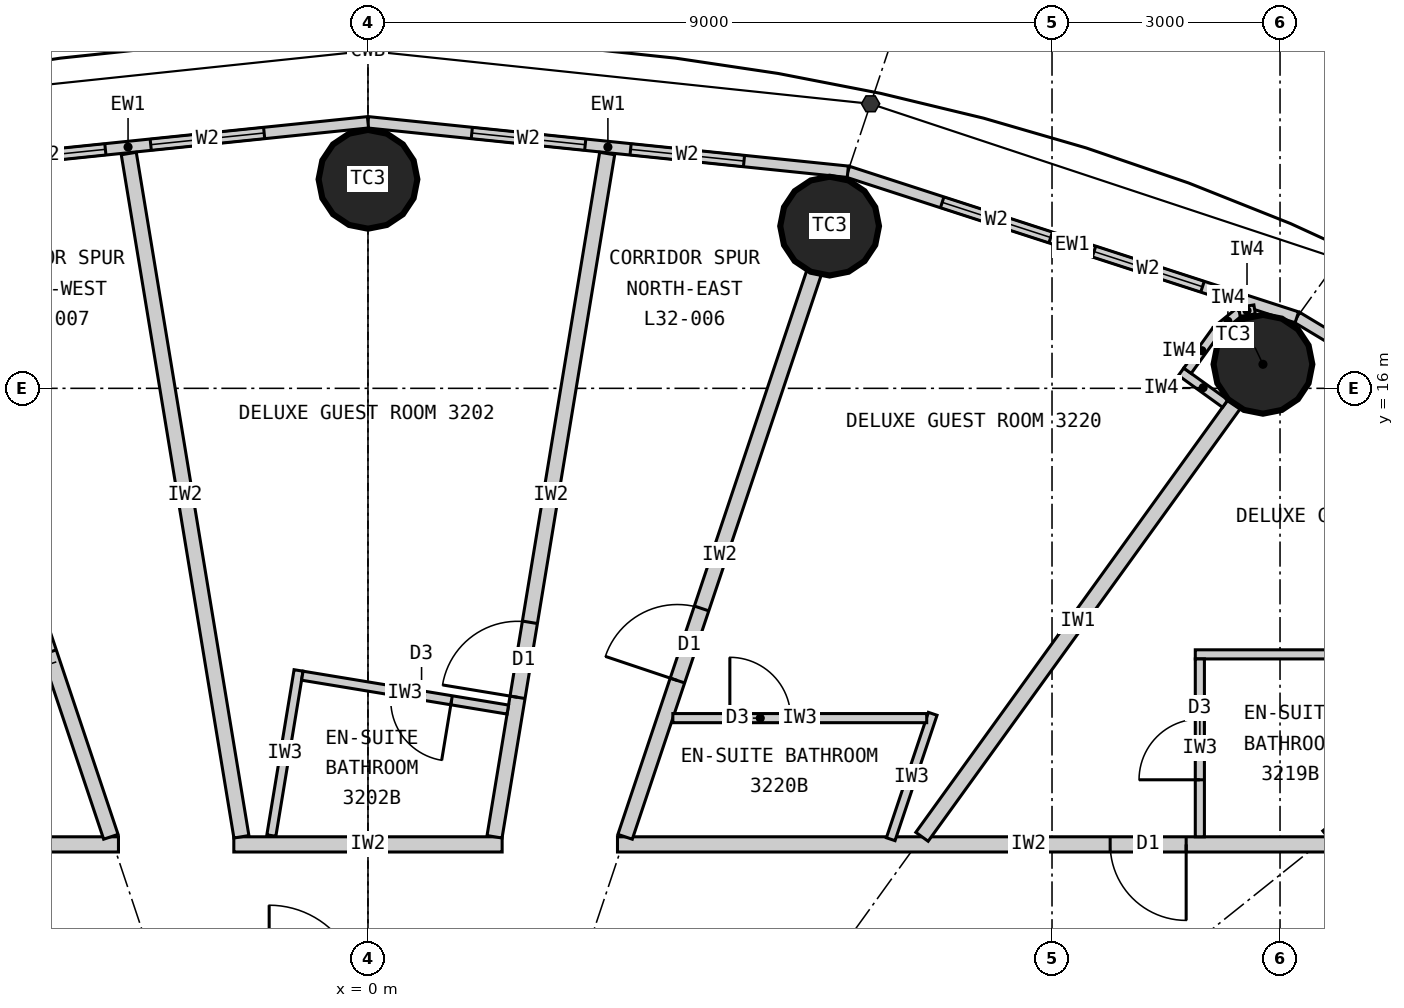
"""IFC4 building model, lengths in metres.
Left out: names, types, materials, properties, quantities, classifications, styles, units other than length and angle.
Written with IfcOpenShell. Run it as: python <this file> out.ifc"""

import sys

from ifc_helpers import new_model, si_unit, direction, frame, frame_2d, origin, origin_2d, place, context, subcontext, project, spatial, rectangle, circle, extrude, element, fill, save


model = new_model("IFC4")
c1 = context("Model", 3, precision=1e-05, world=origin(), true_north=direction((0.0, 1.0)))
c2 = subcontext(c1, "Body", "Model", "MODEL_VIEW")
j1 = project(units=[si_unit("LENGTHUNIT", "METRE"), si_unit("PLANEANGLEUNIT", "RADIAN")], contexts=[c1])
p1 = place(None, origin())
s1 = spatial("IfcSite", under=j1, at=p1, CompositionType="ELEMENT")
p2 = place(p1, origin())
s2 = spatial("IfcBuilding", under=s1, at=p2, CompositionType="ELEMENT")
p3 = place(p2, frame((0.0, 0.0, 125.4)))
s3 = spatial("IfcBuildingStorey", under=s2, at=p3, CompositionType="ELEMENT", Elevation=125.4)
for number, where, z_axis, x_axis in (
    (1, (11.775, 16.316, 0.0), (0.0, 0.0, 1.0), (1.0, 0.0, 0.0)),
    (2, (6.074, 18.135, 0.0), (0.0, 0.0, 1.0), (1.0, 0.0, 0.0)),
    (3, (0.0, 18.75, 0.0), (0.0, 0.0, 1.0), (1.0, 0.0, 0.0)),
):
    element("IfcColumn", number, at=place(p3, frame(where, z_axis=z_axis, x_axis=x_axis)), inside=s3, PredefinedType="COLUMN", context=c2, shape_type="SweptSolid", body=[
        extrude(circle(Radius=0.65, at=origin_2d()), origin(), (0.0, 0.0, 1.0), 3.3),
    ])
p4 = place(p3, frame((17.332, 13.866, 0.0), z_axis=(0.0, 0.0, 1.0), x_axis=(-0.857308573723, 0.514802884044, 0.0)))
e4 = element("IfcWall", 4, at=p4, inside=s3, PredefinedType="ELEMENTEDWALL", context=c2, shape_type="SweptSolid", body=[
    extrude(rectangle(XDim=5.961, YDim=0.15, at=frame_2d((2.98, 0.0))), origin(), (0.0, 0.0, 1.0), 3.12),
])
p5 = place(p4, frame((1.181, 0.0, 0.9)))
e5 = element("IfcOpeningElement", 5, at=p5, cuts=e4, PredefinedType="OPENING", context=c2, shape_type="SweptSolid", body=[
    extrude(rectangle(XDim=1.5, YDim=1.9, at=frame_2d((0.75, 0.95))), frame((0.0, 0.085, 0.0), z_axis=(0.0, -1.0, 0.0), x_axis=(1.0, 0.0, 0.0)), (0.0, 0.0, 1.0), 0.17),
])
p6 = place(p4, frame((3.281, 0.0, 0.9)))
e6 = element("IfcOpeningElement", 6, at=p6, cuts=e4, PredefinedType="OPENING", context=c2, shape_type="SweptSolid", body=[
    extrude(rectangle(XDim=1.5, YDim=1.9, at=frame_2d((0.75, 0.95))), frame((0.0, 0.085, 0.0), z_axis=(0.0, -1.0, 0.0), x_axis=(1.0, 0.0, 0.0)), (0.0, 0.0, 1.0), 0.17),
])
p7 = place(p3, frame((12.221, 16.935, 0.0), z_axis=(0.0, 0.0, 1.0), x_axis=(-0.951272691506, 0.308350881944, 0.0)))
e7 = element("IfcWall", 7, at=p7, inside=s3, PredefinedType="ELEMENTEDWALL", context=c2, shape_type="SweptSolid", body=[
    extrude(rectangle(XDim=6.211, YDim=0.15, at=frame_2d((3.105, 0.0))), origin(), (0.0, 0.0, 1.0), 3.12),
])
p8 = place(p7, frame((1.305, 0.0, 0.9)))
e8 = element("IfcOpeningElement", 8, at=p8, cuts=e7, PredefinedType="OPENING", context=c2, shape_type="SweptSolid", body=[
    extrude(rectangle(XDim=1.5, YDim=1.9, at=frame_2d((0.75, 0.95))), frame((0.0, 0.085, 0.0), z_axis=(0.0, -1.0, 0.0), x_axis=(1.0, 0.0, 0.0)), (0.0, 0.0, 1.0), 0.17),
])
p9 = place(p7, frame((3.405, 0.0, 0.9)))
e9 = element("IfcOpeningElement", 9, at=p9, cuts=e7, PredefinedType="OPENING", context=c2, shape_type="SweptSolid", body=[
    extrude(rectangle(XDim=1.5, YDim=1.9, at=frame_2d((0.75, 0.95))), frame((0.0, 0.085, 0.0), z_axis=(0.0, -1.0, 0.0), x_axis=(1.0, 0.0, 0.0)), (0.0, 0.0, 1.0), 0.17),
])
p10 = place(p3, frame((6.313, 18.85, 0.0), z_axis=(0.0, 0.0, 1.0), x_axis=(-0.994735690163, 0.102473931887, 0.0)))
e10 = element("IfcWall", 10, at=p10, inside=s3, PredefinedType="ELEMENTEDWALL", context=c2, shape_type="SweptSolid", body=[
    extrude(rectangle(XDim=6.347, YDim=0.15, at=frame_2d((3.173, 0.0))), origin(), (0.0, 0.0, 1.0), 3.12),
])
p11 = place(p10, frame((1.373, 0.0, 0.9)))
e11 = element("IfcOpeningElement", 11, at=p11, cuts=e10, PredefinedType="OPENING", context=c2, shape_type="SweptSolid", body=[
    extrude(rectangle(XDim=1.5, YDim=1.9, at=frame_2d((0.75, 0.95))), frame((0.0, 0.085, 0.0), z_axis=(0.0, -1.0, 0.0), x_axis=(1.0, 0.0, 0.0)), (0.0, 0.0, 1.0), 0.17),
])
p12 = place(p10, frame((3.473, 0.0, 0.9)))
e12 = element("IfcOpeningElement", 12, at=p12, cuts=e10, PredefinedType="OPENING", context=c2, shape_type="SweptSolid", body=[
    extrude(rectangle(XDim=1.5, YDim=1.9, at=frame_2d((0.75, 0.95))), frame((0.0, 0.085, 0.0), z_axis=(0.0, -1.0, 0.0), x_axis=(1.0, 0.0, 0.0)), (0.0, 0.0, 1.0), 0.17),
])
p13 = place(p3, frame((0.0, 19.5, 0.0), z_axis=(0.0, 0.0, 1.0), x_axis=(-0.994735690163, -0.102473931887, 0.0)))
e13 = element("IfcWall", 13, at=p13, inside=s3, PredefinedType="ELEMENTEDWALL", context=c2, shape_type="SweptSolid", body=[
    extrude(rectangle(XDim=6.347, YDim=0.15, at=frame_2d((3.173, 0.0))), origin(), (0.0, 0.0, 1.0), 3.12),
])
p14 = place(p13, frame((1.373, 0.0, 0.9)))
e14 = element("IfcOpeningElement", 14, at=p14, cuts=e13, PredefinedType="OPENING", context=c2, shape_type="SweptSolid", body=[
    extrude(rectangle(XDim=1.5, YDim=1.9, at=frame_2d((0.75, 0.95))), frame((0.0, 0.085, 0.0), z_axis=(0.0, -1.0, 0.0), x_axis=(1.0, 0.0, 0.0)), (0.0, 0.0, 1.0), 0.17),
])
p15 = place(p13, frame((3.473, 0.0, 0.9)))
e15 = element("IfcOpeningElement", 15, at=p15, cuts=e13, PredefinedType="OPENING", context=c2, shape_type="SweptSolid", body=[
    extrude(rectangle(XDim=1.5, YDim=1.9, at=frame_2d((0.75, 0.95))), frame((0.0, 0.085, 0.0), z_axis=(0.0, -1.0, 0.0), x_axis=(1.0, 0.0, 0.0)), (0.0, 0.0, 1.0), 0.17),
])
p16 = place(p3, frame((-14.1, 10.0, 0.0), z_axis=(0.0, 0.0, 1.0), x_axis=(1.0, 0.0, 0.0)))
e16 = element("IfcWall", 16, at=p16, inside=s3, PredefinedType="PARTITIONING", context=c2, shape_type="SweptSolid", body=[
    extrude(rectangle(XDim=10.817, YDim=0.2, at=frame_2d((5.409, 0.0))), origin(), (0.0, 0.0, 1.0), 3.12),
])
p17 = place(p3, frame((-1.765, 10.0, 0.0), z_axis=(0.0, 0.0, 1.0), x_axis=(1.0, 0.0, 0.0)))
e17 = element("IfcWall", 17, at=p17, inside=s3, PredefinedType="PARTITIONING", context=c2, shape_type="SweptSolid", body=[
    extrude(rectangle(XDim=3.53, YDim=0.2, at=frame_2d((1.765, 0.0))), origin(), (0.0, 0.0, 1.0), 3.12),
])
p18 = place(p3, frame((3.283, 10.0, 0.0), z_axis=(0.0, 0.0, 1.0), x_axis=(1.0, 0.0, 0.0)))
e18 = element("IfcWall", 18, at=p18, inside=s3, PredefinedType="PARTITIONING", context=c2, shape_type="SweptSolid", body=[
    extrude(rectangle(XDim=10.817, YDim=0.2, at=frame_2d((5.409, 0.0))), origin(), (0.0, 0.0, 1.0), 3.12),
])
p19 = place(p18, frame((6.482, 0.0, 0.0)))
e19 = element("IfcOpeningElement", 19, at=p19, cuts=e18, PredefinedType="OPENING", context=c2, shape_type="SweptSolid", body=[
    extrude(rectangle(XDim=1.0, YDim=2.2, at=frame_2d((0.5, 1.1))), frame((0.0, 0.11, 0.0), z_axis=(0.0, -1.0, 0.0), x_axis=(1.0, 0.0, 0.0)), (0.0, 0.0, 1.0), 0.22),
])
p20 = place(p3, frame((12.625, 10.1, 0.0), z_axis=(0.0, 0.0, 1.0), x_axis=(0.780863644897, 0.624701503182, 0.0)))
e20 = element("IfcWall", 20, at=p20, inside=s3, PredefinedType="PARTITIONING", context=c2, shape_type="SweptSolid", body=[
    extrude(rectangle(XDim=4.612, YDim=0.2, at=frame_2d((2.306, 0.0))), origin(), (0.0, 0.0, 1.0), 2.37),
])
p21 = place(p3, frame((7.289, 10.1, 0.0), z_axis=(0.0, 0.0, 1.0), x_axis=(0.585217367024, 0.81087645997, 0.0)))
e21 = element("IfcWall", 21, at=p21, inside=s3, PredefinedType="PARTITIONING", context=c2, shape_type="SweptSolid", body=[
    extrude(rectangle(XDim=7.016, YDim=0.2, at=frame_2d((3.508, 0.0))), origin(), (0.0, 0.0, 1.0), 2.37),
])
p22 = place(p3, frame((3.383, 10.1, 0.0), z_axis=(0.0, 0.0, 1.0), x_axis=(0.317603705574, 0.948223542318, 0.0)))
e22 = element("IfcWall", 22, at=p22, inside=s3, PredefinedType="PARTITIONING", context=c2, shape_type="SweptSolid", body=[
    extrude(rectangle(XDim=7.823, YDim=0.2, at=frame_2d((3.912, 0.0))), origin(), (0.0, 0.0, 1.0), 2.37),
])
p23 = place(p22, frame((2.168, 0.0, 0.0)))
e23 = element("IfcOpeningElement", 23, at=p23, cuts=e22, PredefinedType="OPENING", context=c2, shape_type="SweptSolid", body=[
    extrude(rectangle(XDim=1.0, YDim=2.2, at=frame_2d((0.5, 1.1))), frame((0.0, 0.11, 0.0), z_axis=(0.0, -1.0, 0.0), x_axis=(1.0, 0.0, 0.0)), (0.0, 0.0, 1.0), 0.22),
])
p24 = place(p3, frame((1.665, 10.1, 0.0), z_axis=(0.0, 0.0, 1.0), x_axis=(0.162660519103, 0.986682094459, 0.0)))
e24 = element("IfcWall", 24, at=p24, inside=s3, PredefinedType="PARTITIONING", context=c2, shape_type="SweptSolid", body=[
    extrude(rectangle(XDim=9.111, YDim=0.2, at=frame_2d((4.555, 0.0))), origin(), (0.0, 0.0, 1.0), 3.12),
])
p25 = place(p24, frame((1.86, 0.0, 0.0)))
e25 = element("IfcOpeningElement", 25, at=p25, cuts=e24, PredefinedType="OPENING", context=c2, shape_type="SweptSolid", body=[
    extrude(rectangle(XDim=1.0, YDim=2.2, at=frame_2d((0.5, 1.1))), frame((0.0, 0.11, 0.0), z_axis=(0.0, -1.0, 0.0), x_axis=(1.0, 0.0, 0.0)), (0.0, 0.0, 1.0), 0.22),
])
p26 = place(p3, frame((-1.665, 10.1, 0.0), z_axis=(0.0, 0.0, 1.0), x_axis=(-0.162660519103, 0.986682094459, 0.0)))
e26 = element("IfcWall", 26, at=p26, inside=s3, PredefinedType="PARTITIONING", context=c2, shape_type="SweptSolid", body=[
    extrude(rectangle(XDim=9.111, YDim=0.2, at=frame_2d((4.555, 0.0))), origin(), (0.0, 0.0, 1.0), 3.12),
])
p27 = place(p3, frame((-3.383, 10.1, 0.0), z_axis=(0.0, 0.0, 1.0), x_axis=(-0.317603705574, 0.948223542318, 0.0)))
e27 = element("IfcWall", 27, at=p27, inside=s3, PredefinedType="PARTITIONING", context=c2, shape_type="SweptSolid", body=[
    extrude(rectangle(XDim=7.823, YDim=0.2, at=frame_2d((3.912, 0.0))), origin(), (0.0, 0.0, 1.0), 2.37),
])
p28 = place(p27, frame((2.56, 0.0, 0.0)))
e28 = element("IfcOpeningElement", 28, at=p28, cuts=e27, PredefinedType="OPENING", context=c2, shape_type="SweptSolid", body=[
    extrude(rectangle(XDim=1.0, YDim=2.2, at=frame_2d((0.5, 1.1))), frame((0.0, 0.11, 0.0), z_axis=(0.0, -1.0, 0.0), x_axis=(1.0, 0.0, 0.0)), (0.0, 0.0, 1.0), 0.22),
])
p29 = place(p3, frame((-1.271, 10.116, 0.0), z_axis=(0.0, 0.0, 1.0), x_axis=(0.162672481395, 0.986680122328, 0.0)))
e29 = element("IfcWall", 29, at=p29, inside=s3, PredefinedType="PARTITIONING", context=c2, shape_type="SweptSolid", body=[
    extrude(rectangle(XDim=2.202, YDim=0.12, at=frame_2d((1.101, 0.0))), origin(), (0.0, 0.0, 1.0), 3.12),
])
p30 = place(p3, frame((1.84, 11.774, 0.0), z_axis=(0.0, 0.0, 1.0), x_axis=(-0.986676602341, 0.162693830222, 0.0)))
e30 = element("IfcWall", 30, at=p30, inside=s3, PredefinedType="PARTITIONING", context=c2, shape_type="SweptSolid", body=[
    extrude(rectangle(XDim=2.74, YDim=0.12, at=frame_2d((1.37, 0.0))), origin(), (0.0, 0.0, 1.0), 3.12),
])
p31 = place(p30, frame((0.75, 0.0, 0.0)))
e31 = element("IfcOpeningElement", 31, at=p31, cuts=e30, PredefinedType="OPENING", context=c2, shape_type="SweptSolid", body=[
    extrude(rectangle(XDim=0.8, YDim=2.1, at=frame_2d((0.4, 1.05))), frame((0.0, 0.07, 0.0), z_axis=(0.0, -1.0, 0.0), x_axis=(1.0, 0.0, 0.0)), (0.0, 0.0, 1.0), 0.14),
])
p32 = place(p3, frame((15.525, 12.5, 0.0), z_axis=(0.0, 0.0, 1.0), x_axis=(-1.0, 0.0, 0.0)))
e32 = element("IfcWall", 32, at=p32, inside=s3, PredefinedType="PARTITIONING", context=c2, shape_type="SweptSolid", body=[
    extrude(rectangle(XDim=4.64, YDim=0.12, at=frame_2d((2.32, 0.0))), origin(), (0.0, 0.0, 1.0), 3.12),
])
p33 = place(p3, frame((10.945, 10.1, 0.0), z_axis=(0.0, 0.0, 1.0), x_axis=(0.0, 1.0, 0.0)))
e33 = element("IfcWall", 33, at=p33, inside=s3, PredefinedType="PARTITIONING", context=c2, shape_type="SweptSolid", body=[
    extrude(rectangle(XDim=2.34, YDim=0.12, at=frame_2d((1.17, 0.0))), origin(), (0.0, 0.0, 1.0), 3.12),
])
p34 = place(p33, frame((0.75, 0.0, 0.0)))
e34 = element("IfcOpeningElement", 34, at=p34, cuts=e33, PredefinedType="OPENING", context=c2, shape_type="SweptSolid", body=[
    extrude(rectangle(XDim=0.8, YDim=2.1, at=frame_2d((0.4, 1.05))), frame((0.0, 0.07, 0.0), z_axis=(0.0, -1.0, 0.0), x_axis=(1.0, 0.0, 0.0)), (0.0, 0.0, 1.0), 0.14),
])
p35 = place(p3, frame((6.878, 10.068, 0.0), z_axis=(0.0, 0.0, 1.0), x_axis=(0.317532394508, 0.948247424694, 0.0)))
e35 = element("IfcWall", 35, at=p35, inside=s3, PredefinedType="PARTITIONING", context=c2, shape_type="SweptSolid", body=[
    extrude(rectangle(XDim=1.74, YDim=0.12, at=frame_2d((0.87, 0.0))), origin(), (0.0, 0.0, 1.0), 3.12),
])
p36 = place(p3, frame((4.011, 11.661, 0.0), z_axis=(0.0, 0.0, 1.0), x_axis=(1.0, 0.0, 0.0)))
e36 = element("IfcWall", 36, at=p36, inside=s3, PredefinedType="PARTITIONING", context=c2, shape_type="SweptSolid", body=[
    extrude(rectangle(XDim=3.34, YDim=0.12, at=frame_2d((1.67, 0.0))), origin(), (0.0, 0.0, 1.0), 3.12),
])
p37 = place(p36, frame((0.75, 0.0, 0.0)))
e37 = element("IfcOpeningElement", 37, at=p37, cuts=e36, PredefinedType="OPENING", context=c2, shape_type="SweptSolid", body=[
    extrude(rectangle(XDim=0.8, YDim=2.1, at=frame_2d((0.4, 1.05))), frame((0.0, 0.07, 0.0), z_axis=(0.0, -1.0, 0.0), x_axis=(1.0, 0.0, 0.0)), (0.0, 0.0, 1.0), 0.14),
])
p38 = place(p3, frame((11.279, 15.799, 0.0), z_axis=(0.0, 0.0, 1.0), x_axis=(-0.810912957127, 0.585166793285, 0.0)))
e38 = element("IfcWall", 38, at=p38, inside=s3, PredefinedType="PARTITIONING", context=c2, shape_type="SweptSolid", body=[
    extrude(rectangle(XDim=0.716, YDim=0.12, at=frame_2d((0.358, 0.0))), origin(), (0.0, 0.0, 1.0), 3.12),
])
p39 = place(p3, frame((10.782, 16.231, 0.0), z_axis=(0.0, 0.0, 1.0), x_axis=(0.585175102182, 0.810906961239, 0.0)))
e39 = element("IfcWall", 39, at=p39, inside=s3, PredefinedType="PARTITIONING", context=c2, shape_type="SweptSolid", body=[
    extrude(rectangle(XDim=0.65, YDim=0.12, at=frame_2d((0.325, 0.0))), origin(), (0.0, 0.0, 1.0), 3.12),
])
p40 = place(p3, frame((11.162, 16.759, 0.0), z_axis=(0.0, 0.0, 1.0), x_axis=(0.775178428527, 0.63174235567, 0.0)))
e40 = element("IfcWall", 40, at=p40, inside=s3, PredefinedType="PARTITIONING", context=c2, shape_type="SweptSolid", body=[
    extrude(rectangle(XDim=0.392, YDim=0.12, at=frame_2d((0.196, 0.0))), origin(), (0.0, 0.0, 1.0), 3.12),
])
p41 = place(p3, frame((11.466, 17.006, 0.0), z_axis=(0.0, 0.0, 1.0), x_axis=(0.987228877621, 0.15930832744, 0.0)))
e41 = element("IfcWall", 41, at=p41, inside=s3, PredefinedType="PARTITIONING", context=c2, shape_type="SweptSolid", body=[
    extrude(rectangle(XDim=0.202, YDim=0.12, at=frame_2d((0.101, 0.0))), origin(), (0.0, 0.0, 1.0), 3.12),
])
p42 = place(p8, origin())
e42 = element("IfcWindow", 42, at=p42, inside=s3, PartitioningType="SINGLE_PANEL", PredefinedType="WINDOW", context=c2, shape_type="SweptSolid", body=[
    extrude(rectangle(XDim=1.5, YDim=1.9, at=frame_2d((0.75, 0.95))), frame((0.0, 0.03, 0.0), z_axis=(0.0, -1.0, 0.0), x_axis=(1.0, 0.0, 0.0)), (0.0, 0.0, 1.0), 0.06),
])
fill(e8, e42)
p43 = place(p9, origin())
e43 = element("IfcWindow", 43, at=p43, inside=s3, PartitioningType="SINGLE_PANEL", PredefinedType="WINDOW", context=c2, shape_type="SweptSolid", body=[
    extrude(rectangle(XDim=1.5, YDim=1.9, at=frame_2d((0.75, 0.95))), frame((0.0, 0.03, 0.0), z_axis=(0.0, -1.0, 0.0), x_axis=(1.0, 0.0, 0.0)), (0.0, 0.0, 1.0), 0.06),
])
fill(e9, e43)
p44 = place(p11, origin())
e44 = element("IfcWindow", 44, at=p44, inside=s3, PartitioningType="SINGLE_PANEL", PredefinedType="WINDOW", context=c2, shape_type="SweptSolid", body=[
    extrude(rectangle(XDim=1.5, YDim=1.9, at=frame_2d((0.75, 0.95))), frame((0.0, 0.03, 0.0), z_axis=(0.0, -1.0, 0.0), x_axis=(1.0, 0.0, 0.0)), (0.0, 0.0, 1.0), 0.06),
])
fill(e11, e44)
p45 = place(p12, origin())
e45 = element("IfcWindow", 45, at=p45, inside=s3, PartitioningType="SINGLE_PANEL", PredefinedType="WINDOW", context=c2, shape_type="SweptSolid", body=[
    extrude(rectangle(XDim=1.5, YDim=1.9, at=frame_2d((0.75, 0.95))), frame((0.0, 0.03, 0.0), z_axis=(0.0, -1.0, 0.0), x_axis=(1.0, 0.0, 0.0)), (0.0, 0.0, 1.0), 0.06),
])
fill(e12, e45)
p46 = place(p14, origin())
e46 = element("IfcWindow", 46, at=p46, inside=s3, PartitioningType="SINGLE_PANEL", PredefinedType="WINDOW", context=c2, shape_type="SweptSolid", body=[
    extrude(rectangle(XDim=1.5, YDim=1.9, at=frame_2d((0.75, 0.95))), frame((0.0, 0.03, 0.0), z_axis=(0.0, -1.0, 0.0), x_axis=(1.0, 0.0, 0.0)), (0.0, 0.0, 1.0), 0.06),
])
fill(e14, e46)
p47 = place(p15, origin())
e47 = element("IfcWindow", 47, at=p47, inside=s3, PartitioningType="SINGLE_PANEL", PredefinedType="WINDOW", context=c2, shape_type="SweptSolid", body=[
    extrude(rectangle(XDim=1.5, YDim=1.9, at=frame_2d((0.75, 0.95))), frame((0.0, 0.03, 0.0), z_axis=(0.0, -1.0, 0.0), x_axis=(1.0, 0.0, 0.0)), (0.0, 0.0, 1.0), 0.06),
])
fill(e15, e47)
p48 = place(p31, origin())
e48 = element("IfcDoor", 48, at=p48, inside=s3, OperationType="SINGLE_SWING_LEFT", PredefinedType="DOOR", context=c2, shape_type="SweptSolid", body=[
    extrude(rectangle(XDim=0.8, YDim=2.1, at=frame_2d((0.4, 1.05))), frame((0.0, 0.025, 0.0), z_axis=(0.0, -1.0, 0.0), x_axis=(1.0, 0.0, 0.0)), (0.0, 0.0, 1.0), 0.05),
])
fill(e31, e48)
p49 = place(p25, origin())
e49 = element("IfcDoor", 49, at=p49, inside=s3, OperationType="SINGLE_SWING_LEFT", PredefinedType="DOOR", context=c2, shape_type="SweptSolid", body=[
    extrude(rectangle(XDim=1.0, YDim=2.2, at=frame_2d((0.5, 1.1))), frame((0.0, 0.025, 0.0), z_axis=(0.0, -1.0, 0.0), x_axis=(1.0, 0.0, 0.0)), (0.0, 0.0, 1.0), 0.05),
])
fill(e25, e49)
p50 = place(p34, origin())
e50 = element("IfcDoor", 50, at=p50, inside=s3, OperationType="SINGLE_SWING_LEFT", PredefinedType="DOOR", context=c2, shape_type="SweptSolid", body=[
    extrude(rectangle(XDim=0.8, YDim=2.1, at=frame_2d((0.4, 1.05))), frame((0.0, 0.025, 0.0), z_axis=(0.0, -1.0, 0.0), x_axis=(1.0, 0.0, 0.0)), (0.0, 0.0, 1.0), 0.05),
])
fill(e34, e50)
p51 = place(p19, origin())
e51 = element("IfcDoor", 51, at=p51, inside=s3, OperationType="SINGLE_SWING_RIGHT", PredefinedType="DOOR", context=c2, shape_type="SweptSolid", body=[
    extrude(rectangle(XDim=1.0, YDim=2.2, at=frame_2d((0.5, 1.1))), frame((0.0, 0.025, 0.0), z_axis=(0.0, -1.0, 0.0), x_axis=(1.0, 0.0, 0.0)), (0.0, 0.0, 1.0), 0.05),
])
fill(e19, e51)
p52 = place(p37, origin())
e52 = element("IfcDoor", 52, at=p52, inside=s3, OperationType="SINGLE_SWING_LEFT", PredefinedType="DOOR", context=c2, shape_type="SweptSolid", body=[
    extrude(rectangle(XDim=0.8, YDim=2.1, at=frame_2d((0.4, 1.05))), frame((0.0, 0.025, 0.0), z_axis=(0.0, -1.0, 0.0), x_axis=(1.0, 0.0, 0.0)), (0.0, 0.0, 1.0), 0.05),
])
fill(e37, e52)
p53 = place(p23, origin())
e53 = element("IfcDoor", 53, at=p53, inside=s3, OperationType="SINGLE_SWING_LEFT", PredefinedType="DOOR", context=c2, shape_type="SweptSolid", body=[
    extrude(rectangle(XDim=1.0, YDim=2.2, at=frame_2d((0.5, 1.1))), frame((0.0, 0.025, 0.0), z_axis=(0.0, -1.0, 0.0), x_axis=(1.0, 0.0, 0.0)), (0.0, 0.0, 1.0), 0.05),
])
fill(e23, e53)
save(model, sys.argv[1])
